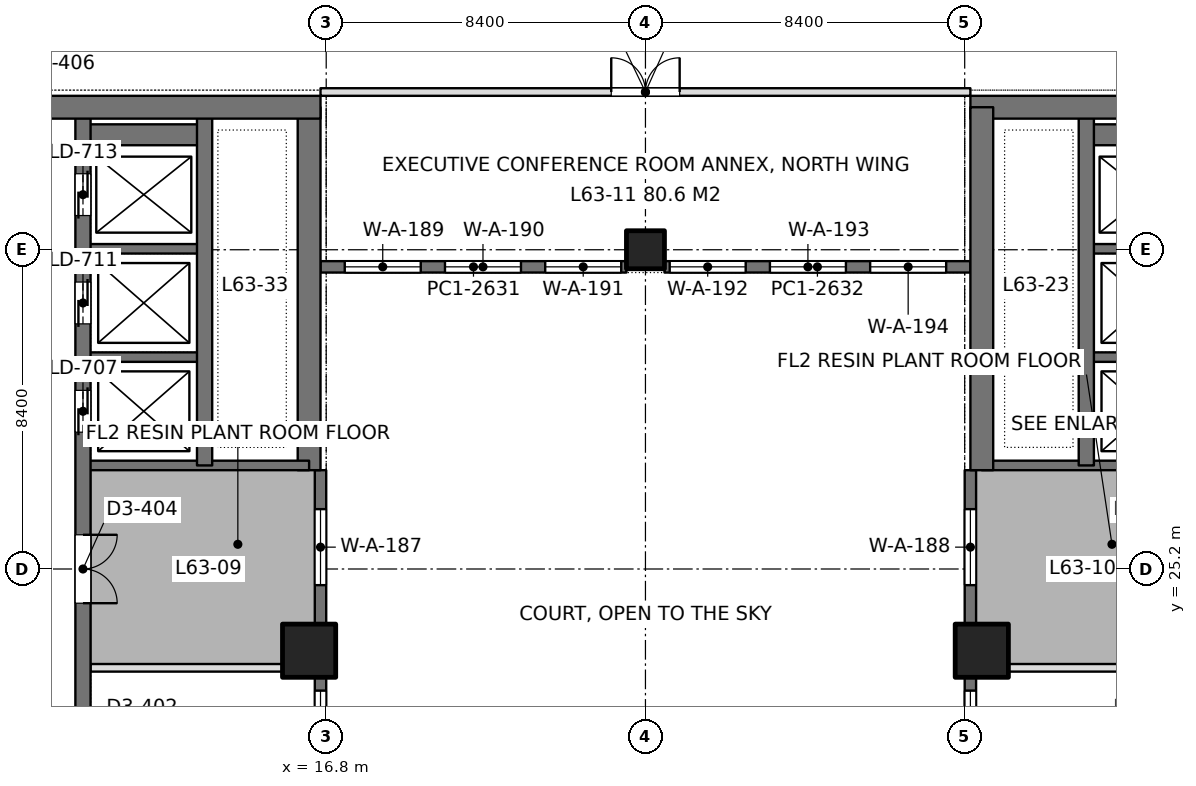
"""IFC4 building model, lengths in metres.
Left out: names, types, materials, properties, quantities, classifications, styles, units other than length and angle.
Written with IfcOpenShell. Run it as: python <this file> out.ifc"""

import sys

from ifc_helpers import new_model, si_unit, direction, frame, frame_2d, origin, origin_2d, place, context, subcontext, project, spatial, rectangle, extrude, element, fill, save


model = new_model("IFC4")
c1 = context("Model", 3, precision=1e-05, world=origin(), true_north=direction((0.0, 1.0)))
c2 = subcontext(c1, "Body", "Model", "MODEL_VIEW")
j1 = project(units=[si_unit("LENGTHUNIT", "METRE"), si_unit("PLANEANGLEUNIT", "RADIAN")], contexts=[c1])
p1 = place(None, origin())
s1 = spatial("IfcSite", under=j1, at=p1, CompositionType="ELEMENT")
p2 = place(p1, origin())
s2 = spatial("IfcBuilding", under=s1, at=p2, CompositionType="ELEMENT")
p3 = place(p2, frame((0.0, 0.0, 277.2)))
s3 = spatial("IfcBuildingStorey", under=s2, at=p3, CompositionType="ELEMENT", Elevation=277.2)
p4 = place(p3, frame((25.2, 33.6, 0.0), z_axis=(0.0, 0.0, 1.0), x_axis=(1.0, 0.0, 0.0)))
e1 = element("IfcColumn", 1, at=p4, inside=s3, PredefinedType="COLUMN", context=c2, shape_type="SweptSolid", body=[
    extrude(rectangle(XDim=1.0, YDim=1.0, at=origin_2d()), origin(), (0.0, 0.0, 1.0), 4.5),
])
for number, where, z_axis, x_axis in (
    (2, (16.35, 23.05, 0.0), (0.0, 0.0, 1.0), (1.0, 0.0, 0.0)),
    (3, (34.05, 23.05, 0.0), (0.0, 0.0, 1.0), (1.0, 0.0, 0.0)),
):
    element("IfcColumn", number, at=place(p3, frame(where, z_axis=z_axis, x_axis=x_axis)), inside=s3, PredefinedType="COLUMN", context=c2, shape_type="SweptSolid", body=[
        extrude(rectangle(XDim=1.4, YDim=1.4, at=origin_2d()), origin(), (0.0, 0.0, 1.0), 4.5),
    ])
p5 = place(p3, frame((-1.05, 37.35, 0.0), z_axis=(0.0, 0.0, 1.0), x_axis=(1.0, 0.0, 0.0)))
e4 = element("IfcWall", 4, at=p5, inside=s3, PredefinedType="SHEAR", context=c2, shape_type="SweptSolid", body=[
    extrude(rectangle(XDim=17.7, YDim=0.6, at=frame_2d((8.85, 0.0))), origin(), (0.0, 0.0, 1.0), 4.5),
])
p6 = place(p5, frame((8.8, 0.0, 0.0)))
e5 = element("IfcOpeningElement", 5, at=p6, cuts=e4, PredefinedType="OPENING", context=c2, shape_type="SweptSolid", body=[
    extrude(rectangle(XDim=1.8, YDim=2.4, at=frame_2d((0.9, 1.2))), frame((0.0, 0.31, 0.0), z_axis=(0.0, -1.0, 0.0), x_axis=(1.0, 0.0, 0.0)), (0.0, 0.0, 1.0), 0.62),
])
p7 = place(p3, frame((16.35, 27.8, 0.0), z_axis=(0.0, 0.0, 1.0), x_axis=(0.0, 1.0, 0.0)))
e6 = element("IfcWall", 6, at=p7, inside=s3, PredefinedType="SHEAR", context=c2, shape_type="SweptSolid", body=[
    extrude(rectangle(XDim=9.55, YDim=0.6, at=frame_2d((4.775, 0.0))), origin(), (0.0, 0.0, 1.0), 4.5),
])
p8 = place(p3, frame((10.4, 13.05, 0.0), z_axis=(0.0, 0.0, 1.0), x_axis=(0.0, 1.0, 0.0)))
e7 = element("IfcWall", 7, at=p8, inside=s3, PredefinedType="SHEAR", context=c2, shape_type="SweptSolid", body=[
    extrude(rectangle(XDim=24.3, YDim=0.4, at=frame_2d((12.15, 0.0))), origin(), (0.0, 0.0, 1.0), 4.5),
])
p9 = place(p8, frame((15.75, 0.0, 0.0)))
e8 = element("IfcOpeningElement", 8, at=p9, cuts=e7, PredefinedType="OPENING", context=c2, shape_type="SweptSolid", body=[
    extrude(rectangle(XDim=1.1, YDim=2.2, at=frame_2d((0.55, 1.1))), frame((0.0, 0.21, 0.0), z_axis=(0.0, -1.0, 0.0), x_axis=(1.0, 0.0, 0.0)), (0.0, 0.0, 1.0), 0.42),
])
p10 = place(p8, frame((18.6, 0.0, 0.0)))
e9 = element("IfcOpeningElement", 9, at=p10, cuts=e7, PredefinedType="OPENING", context=c2, shape_type="SweptSolid", body=[
    extrude(rectangle(XDim=1.1, YDim=2.2, at=frame_2d((0.55, 1.1))), frame((0.0, 0.21, 0.0), z_axis=(0.0, -1.0, 0.0), x_axis=(1.0, 0.0, 0.0)), (0.0, 0.0, 1.0), 0.42),
])
p11 = place(p8, frame((21.45, 0.0, 0.0)))
e10 = element("IfcOpeningElement", 10, at=p11, cuts=e7, PredefinedType="OPENING", context=c2, shape_type="SweptSolid", body=[
    extrude(rectangle(XDim=1.1, YDim=2.2, at=frame_2d((0.55, 1.1))), frame((0.0, 0.21, 0.0), z_axis=(0.0, -1.0, 0.0), x_axis=(1.0, 0.0, 0.0)), (0.0, 0.0, 1.0), 0.42),
])
p12 = place(p8, frame((6.05, 0.0, 0.0)))
e11 = element("IfcOpeningElement", 11, at=p12, cuts=e7, PredefinedType="OPENING", context=c2, shape_type="SweptSolid", body=[
    extrude(rectangle(XDim=1.8, YDim=2.4, at=frame_2d((0.9, 1.2))), frame((0.0, 0.21, 0.0), z_axis=(0.0, -1.0, 0.0), x_axis=(1.0, 0.0, 0.0)), (0.0, 0.0, 1.0), 0.42),
])
p13 = place(p8, frame((11.25, 0.0, 0.0)))
e12 = element("IfcOpeningElement", 12, at=p13, cuts=e7, PredefinedType="OPENING", context=c2, shape_type="SweptSolid", body=[
    extrude(rectangle(XDim=1.8, YDim=2.4, at=frame_2d((0.9, 1.2))), frame((0.0, 0.21, 0.0), z_axis=(0.0, -1.0, 0.0), x_axis=(1.0, 0.0, 0.0)), (0.0, 0.0, 1.0), 0.42),
])
p14 = place(p3, frame((13.6, 27.925, 0.0), z_axis=(0.0, 0.0, 1.0), x_axis=(0.0, 1.0, 0.0)))
e13 = element("IfcWall", 13, at=p14, inside=s3, PredefinedType="SHEAR", context=c2, shape_type="SweptSolid", body=[
    extrude(rectangle(XDim=9.425, YDim=0.4, at=frame_2d((4.712, 0.0))), origin(), (0.0, 0.0, 1.0), 4.5),
])
p15 = place(p3, frame((10.4, 27.925, 0.0), z_axis=(0.0, 0.0, 1.0), x_axis=(1.0, 0.0, 0.0)))
e14 = element("IfcWall", 14, at=p15, inside=s3, PredefinedType="SHEAR", context=c2, shape_type="SweptSolid", body=[
    extrude(rectangle(XDim=5.95, YDim=0.25, at=frame_2d((2.975, 0.0))), origin(), (0.0, 0.0, 1.0), 4.5),
])
for number, where, z_axis, x_axis in (
    (15, (10.4, 30.775, 0.0), (0.0, 0.0, 1.0), (1.0, 0.0, 0.0)),
    (16, (10.4, 33.625, 0.0), (0.0, 0.0, 1.0), (1.0, 0.0, 0.0)),
):
    element("IfcWall", number, at=place(p3, frame(where, z_axis=z_axis, x_axis=x_axis)), inside=s3, PredefinedType="SHEAR", context=c2, shape_type="SweptSolid", body=[
        extrude(rectangle(XDim=3.2, YDim=0.25, at=frame_2d((1.6, 0.0))), origin(), (0.0, 0.0, 1.0), 4.5),
    ])
p16 = place(p3, frame((10.4, 36.625, 0.0), z_axis=(0.0, 0.0, 1.0), x_axis=(1.0, 0.0, 0.0)))
e17 = element("IfcWall", 17, at=p16, inside=s3, PredefinedType="SHEAR", context=c2, shape_type="SweptSolid", body=[
    extrude(rectangle(XDim=3.2, YDim=0.55, at=frame_2d((1.6, 0.0))), origin(), (0.0, 0.0, 1.0), 4.5),
])
p17 = place(p3, frame((33.75, 37.35, 0.0), z_axis=(0.0, 0.0, 1.0), x_axis=(1.0, 0.0, 0.0)))
e18 = element("IfcWall", 18, at=p17, inside=s3, PredefinedType="SHEAR", context=c2, shape_type="SweptSolid", body=[
    extrude(rectangle(XDim=17.7, YDim=0.6, at=frame_2d((8.85, 0.0))), origin(), (0.0, 0.0, 1.0), 4.5),
])
p18 = place(p17, frame((7.1, 0.0, 0.0)))
e19 = element("IfcOpeningElement", 19, at=p18, cuts=e18, PredefinedType="OPENING", context=c2, shape_type="SweptSolid", body=[
    extrude(rectangle(XDim=1.8, YDim=2.4, at=frame_2d((0.9, 1.2))), frame((0.0, 0.31, 0.0), z_axis=(0.0, -1.0, 0.0), x_axis=(1.0, 0.0, 0.0)), (0.0, 0.0, 1.0), 0.62),
])
p19 = place(p3, frame((34.05, 27.8, 0.0), z_axis=(0.0, 0.0, 1.0), x_axis=(0.0, 1.0, 0.0)))
e20 = element("IfcWall", 20, at=p19, inside=s3, PredefinedType="SHEAR", context=c2, shape_type="SweptSolid", body=[
    extrude(rectangle(XDim=9.55, YDim=0.6, at=frame_2d((4.775, 0.0))), origin(), (0.0, 0.0, 1.0), 4.5),
])
p20 = place(p3, frame((36.8, 27.925, 0.0), z_axis=(0.0, 0.0, 1.0), x_axis=(0.0, 1.0, 0.0)))
e21 = element("IfcWall", 21, at=p20, inside=s3, PredefinedType="SHEAR", context=c2, shape_type="SweptSolid", body=[
    extrude(rectangle(XDim=9.425, YDim=0.4, at=frame_2d((4.712, 0.0))), origin(), (0.0, 0.0, 1.0), 4.5),
])
p21 = place(p3, frame((40.0, 27.925, 0.0), z_axis=(0.0, 0.0, 1.0), x_axis=(-1.0, 0.0, 0.0)))
e22 = element("IfcWall", 22, at=p21, inside=s3, PredefinedType="SHEAR", context=c2, shape_type="SweptSolid", body=[
    extrude(rectangle(XDim=5.95, YDim=0.25, at=frame_2d((2.975, 0.0))), origin(), (0.0, 0.0, 1.0), 4.5),
])
for number, where, z_axis, x_axis in (
    (23, (40.0, 30.775, 0.0), (0.0, 0.0, 1.0), (-1.0, 0.0, 0.0)),
    (24, (40.0, 33.625, 0.0), (0.0, 0.0, 1.0), (-1.0, 0.0, 0.0)),
):
    element("IfcWall", number, at=place(p3, frame(where, z_axis=z_axis, x_axis=x_axis)), inside=s3, PredefinedType="SHEAR", context=c2, shape_type="SweptSolid", body=[
        extrude(rectangle(XDim=3.2, YDim=0.25, at=frame_2d((1.6, 0.0))), origin(), (0.0, 0.0, 1.0), 4.5),
    ])
p22 = place(p3, frame((40.0, 36.625, 0.0), z_axis=(0.0, 0.0, 1.0), x_axis=(-1.0, 0.0, 0.0)))
e25 = element("IfcWall", 25, at=p22, inside=s3, PredefinedType="SHEAR", context=c2, shape_type="SweptSolid", body=[
    extrude(rectangle(XDim=3.2, YDim=0.55, at=frame_2d((1.6, 0.0))), origin(), (0.0, 0.0, 1.0), 4.5),
])
p23 = place(p3, frame((16.65, 17.1, 0.0), z_axis=(0.0, 0.0, 1.0), x_axis=(0.0, 1.0, 0.0)))
e26 = element("IfcWall", 26, at=p23, inside=s3, PredefinedType="SOLIDWALL", context=c2, shape_type="SweptSolid", body=[
    extrude(rectangle(XDim=10.7, YDim=0.3, at=frame_2d((5.35, 0.0))), origin(), (0.0, 0.0, 1.0), 4.3),
])
p24 = place(p23, frame((0.55, 0.0, 0.1)))
e27 = element("IfcOpeningElement", 27, at=p24, cuts=e26, PredefinedType="OPENING", context=c2, shape_type="SweptSolid", body=[
    extrude(rectangle(XDim=2.0, YDim=3.0, at=frame_2d((1.0, 1.5))), frame((0.0, 0.16, 0.0), z_axis=(0.0, -1.0, 0.0), x_axis=(1.0, 0.0, 0.0)), (0.0, 0.0, 1.0), 0.32),
])
p25 = place(p23, frame((2.9, 0.0, 0.1)))
e28 = element("IfcOpeningElement", 28, at=p25, cuts=e26, PredefinedType="OPENING", context=c2, shape_type="SweptSolid", body=[
    extrude(rectangle(XDim=2.0, YDim=3.0, at=frame_2d((1.0, 1.5))), frame((0.0, 0.16, 0.0), z_axis=(0.0, -1.0, 0.0), x_axis=(1.0, 0.0, 0.0)), (0.0, 0.0, 1.0), 0.32),
])
p26 = place(p23, frame((7.675, 0.0, 0.1)))
e29 = element("IfcOpeningElement", 29, at=p26, cuts=e26, PredefinedType="OPENING", context=c2, shape_type="SweptSolid", body=[
    extrude(rectangle(XDim=2.0, YDim=3.0, at=frame_2d((1.0, 1.5))), frame((0.0, 0.16, 0.0), z_axis=(0.0, -1.0, 0.0), x_axis=(1.0, 0.0, 0.0)), (0.0, 0.0, 1.0), 0.32),
])
p27 = place(p3, frame((33.75, 17.1, 0.0), z_axis=(0.0, 0.0, 1.0), x_axis=(0.0, 1.0, 0.0)))
e30 = element("IfcWall", 30, at=p27, inside=s3, PredefinedType="SOLIDWALL", context=c2, shape_type="SweptSolid", body=[
    extrude(rectangle(XDim=10.7, YDim=0.3, at=frame_2d((5.35, 0.0))), origin(), (0.0, 0.0, 1.0), 4.3),
])
p28 = place(p27, frame((0.55, 0.0, 0.1)))
e31 = element("IfcOpeningElement", 31, at=p28, cuts=e30, PredefinedType="OPENING", context=c2, shape_type="SweptSolid", body=[
    extrude(rectangle(XDim=2.0, YDim=3.0, at=frame_2d((1.0, 1.5))), frame((0.0, 0.16, 0.0), z_axis=(0.0, -1.0, 0.0), x_axis=(1.0, 0.0, 0.0)), (0.0, 0.0, 1.0), 0.32),
])
p29 = place(p27, frame((2.9, 0.0, 0.1)))
e32 = element("IfcOpeningElement", 32, at=p29, cuts=e30, PredefinedType="OPENING", context=c2, shape_type="SweptSolid", body=[
    extrude(rectangle(XDim=2.0, YDim=3.0, at=frame_2d((1.0, 1.5))), frame((0.0, 0.16, 0.0), z_axis=(0.0, -1.0, 0.0), x_axis=(1.0, 0.0, 0.0)), (0.0, 0.0, 1.0), 0.32),
])
p30 = place(p27, frame((7.675, 0.0, 0.1)))
e33 = element("IfcOpeningElement", 33, at=p30, cuts=e30, PredefinedType="OPENING", context=c2, shape_type="SweptSolid", body=[
    extrude(rectangle(XDim=2.0, YDim=3.0, at=frame_2d((1.0, 1.5))), frame((0.0, 0.16, 0.0), z_axis=(0.0, -1.0, 0.0), x_axis=(1.0, 0.0, 0.0)), (0.0, 0.0, 1.0), 0.32),
])
p31 = place(p3, frame((16.65, 33.15, 0.0), z_axis=(0.0, 0.0, 1.0), x_axis=(1.0, 0.0, 0.0)))
e34 = element("IfcWall", 34, at=p31, inside=s3, PredefinedType="SOLIDWALL", context=c2, shape_type="SweptSolid", body=[
    extrude(rectangle(XDim=8.05, YDim=0.3, at=frame_2d((4.025, 0.0))), origin(), (0.0, 0.0, 1.0), 4.3),
])
p32 = place(p31, frame((0.637, 0.0, 0.1)))
e35 = element("IfcOpeningElement", 35, at=p32, cuts=e34, PredefinedType="OPENING", context=c2, shape_type="SweptSolid", body=[
    extrude(rectangle(XDim=2.0, YDim=3.0, at=frame_2d((1.0, 1.5))), frame((0.0, 0.16, 0.0), z_axis=(0.0, -1.0, 0.0), x_axis=(1.0, 0.0, 0.0)), (0.0, 0.0, 1.0), 0.32),
])
p33 = place(p31, frame((3.275, 0.0, 0.1)))
e36 = element("IfcOpeningElement", 36, at=p33, cuts=e34, PredefinedType="OPENING", context=c2, shape_type="SweptSolid", body=[
    extrude(rectangle(XDim=2.0, YDim=3.0, at=frame_2d((1.0, 1.5))), frame((0.0, 0.16, 0.0), z_axis=(0.0, -1.0, 0.0), x_axis=(1.0, 0.0, 0.0)), (0.0, 0.0, 1.0), 0.32),
])
p34 = place(p31, frame((5.913, 0.0, 0.1)))
e37 = element("IfcOpeningElement", 37, at=p34, cuts=e34, PredefinedType="OPENING", context=c2, shape_type="SweptSolid", body=[
    extrude(rectangle(XDim=2.0, YDim=3.0, at=frame_2d((1.0, 1.5))), frame((0.0, 0.16, 0.0), z_axis=(0.0, -1.0, 0.0), x_axis=(1.0, 0.0, 0.0)), (0.0, 0.0, 1.0), 0.32),
])
p35 = place(p3, frame((25.7, 33.15, 0.0), z_axis=(0.0, 0.0, 1.0), x_axis=(1.0, 0.0, 0.0)))
e38 = element("IfcWall", 38, at=p35, inside=s3, PredefinedType="SOLIDWALL", context=c2, shape_type="SweptSolid", body=[
    extrude(rectangle(XDim=8.05, YDim=0.3, at=frame_2d((4.025, 0.0))), origin(), (0.0, 0.0, 1.0), 4.3),
])
p36 = place(p35, frame((0.137, 0.0, 0.1)))
e39 = element("IfcOpeningElement", 39, at=p36, cuts=e38, PredefinedType="OPENING", context=c2, shape_type="SweptSolid", body=[
    extrude(rectangle(XDim=2.0, YDim=3.0, at=frame_2d((1.0, 1.5))), frame((0.0, 0.16, 0.0), z_axis=(0.0, -1.0, 0.0), x_axis=(1.0, 0.0, 0.0)), (0.0, 0.0, 1.0), 0.32),
])
p37 = place(p35, frame((2.775, 0.0, 0.1)))
e40 = element("IfcOpeningElement", 40, at=p37, cuts=e38, PredefinedType="OPENING", context=c2, shape_type="SweptSolid", body=[
    extrude(rectangle(XDim=2.0, YDim=3.0, at=frame_2d((1.0, 1.5))), frame((0.0, 0.16, 0.0), z_axis=(0.0, -1.0, 0.0), x_axis=(1.0, 0.0, 0.0)), (0.0, 0.0, 1.0), 0.32),
])
p38 = place(p35, frame((5.413, 0.0, 0.1)))
e41 = element("IfcOpeningElement", 41, at=p38, cuts=e38, PredefinedType="OPENING", context=c2, shape_type="SweptSolid", body=[
    extrude(rectangle(XDim=2.0, YDim=3.0, at=frame_2d((1.0, 1.5))), frame((0.0, 0.16, 0.0), z_axis=(0.0, -1.0, 0.0), x_axis=(1.0, 0.0, 0.0)), (0.0, 0.0, 1.0), 0.32),
])
for number, where, z_axis, x_axis in (
    (42, (10.598, 22.6, 0.0), (0.0, 0.0, 1.0), (1.0, 0.0, 0.0)),
    (43, (34.749, 22.6, 0.0), (0.0, 0.0, 1.0), (1.0, 0.0, 0.0)),
):
    element("IfcWall", number, at=place(p3, frame(where, z_axis=z_axis, x_axis=x_axis)), inside=s3, PredefinedType="PARTITIONING", context=c2, shape_type="SweptSolid", body=[
        extrude(rectangle(XDim=5.053, YDim=0.2, at=frame_2d((2.526, 0.0))), origin(), (0.0, 0.0, 1.0), 4.3),
    ])
p39 = place(p3, frame((16.65, 37.75, 0.0), z_axis=(0.0, 0.0, 1.0), x_axis=(1.0, 0.0, 0.0)))
e44 = element("IfcWall", 44, at=p39, inside=s3, PredefinedType="PARTITIONING", context=c2, shape_type="SweptSolid", body=[
    extrude(rectangle(XDim=17.1, YDim=0.2, at=frame_2d((8.55, 0.0))), origin(), (0.0, 0.0, 1.0), 3.182),
])
p40 = place(p39, frame((7.65, 0.0, 0.0)))
e45 = element("IfcOpeningElement", 45, at=p40, cuts=e44, PredefinedType="OPENING", context=c2, shape_type="SweptSolid", body=[
    extrude(rectangle(XDim=1.8, YDim=2.2, at=frame_2d((0.9, 1.1))), frame((0.0, 0.11, 0.0), z_axis=(0.0, -1.0, 0.0), x_axis=(1.0, 0.0, 0.0)), (0.0, 0.0, 1.0), 0.22),
])
p41 = place(p25, origin())
e46 = element("IfcWindow", 46, at=p41, inside=s3, PartitioningType="SINGLE_PANEL", PredefinedType="WINDOW", context=c2, shape_type="SweptSolid", body=[
    extrude(rectangle(XDim=2.0, YDim=3.0, at=frame_2d((1.0, 1.5))), frame((0.0, 0.03, 0.0), z_axis=(0.0, -1.0, 0.0), x_axis=(1.0, 0.0, 0.0)), (0.0, 0.0, 1.0), 0.06),
])
fill(e28, e46)
p42 = place(p26, origin())
e47 = element("IfcWindow", 47, at=p42, inside=s3, PartitioningType="SINGLE_PANEL", PredefinedType="WINDOW", context=c2, shape_type="SweptSolid", body=[
    extrude(rectangle(XDim=2.0, YDim=3.0, at=frame_2d((1.0, 1.5))), frame((0.0, 0.03, 0.0), z_axis=(0.0, -1.0, 0.0), x_axis=(1.0, 0.0, 0.0)), (0.0, 0.0, 1.0), 0.06),
])
fill(e29, e47)
p43 = place(p29, origin())
e48 = element("IfcWindow", 48, at=p43, inside=s3, PartitioningType="SINGLE_PANEL", PredefinedType="WINDOW", context=c2, shape_type="SweptSolid", body=[
    extrude(rectangle(XDim=2.0, YDim=3.0, at=frame_2d((1.0, 1.5))), frame((0.0, 0.03, 0.0), z_axis=(0.0, -1.0, 0.0), x_axis=(1.0, 0.0, 0.0)), (0.0, 0.0, 1.0), 0.06),
])
fill(e32, e48)
p44 = place(p30, origin())
e49 = element("IfcWindow", 49, at=p44, inside=s3, PartitioningType="SINGLE_PANEL", PredefinedType="WINDOW", context=c2, shape_type="SweptSolid", body=[
    extrude(rectangle(XDim=2.0, YDim=3.0, at=frame_2d((1.0, 1.5))), frame((0.0, 0.03, 0.0), z_axis=(0.0, -1.0, 0.0), x_axis=(1.0, 0.0, 0.0)), (0.0, 0.0, 1.0), 0.06),
])
fill(e33, e49)
p45 = place(p32, origin())
e50 = element("IfcWindow", 50, at=p45, inside=s3, PartitioningType="SINGLE_PANEL", PredefinedType="WINDOW", context=c2, shape_type="SweptSolid", body=[
    extrude(rectangle(XDim=2.0, YDim=3.0, at=frame_2d((1.0, 1.5))), frame((0.0, 0.03, 0.0), z_axis=(0.0, -1.0, 0.0), x_axis=(1.0, 0.0, 0.0)), (0.0, 0.0, 1.0), 0.06),
])
fill(e35, e50)
p46 = place(p33, origin())
e51 = element("IfcWindow", 51, at=p46, inside=s3, PartitioningType="SINGLE_PANEL", PredefinedType="WINDOW", context=c2, shape_type="SweptSolid", body=[
    extrude(rectangle(XDim=2.0, YDim=3.0, at=frame_2d((1.0, 1.5))), frame((0.0, 0.03, 0.0), z_axis=(0.0, -1.0, 0.0), x_axis=(1.0, 0.0, 0.0)), (0.0, 0.0, 1.0), 0.06),
])
fill(e36, e51)
p47 = place(p34, origin())
e52 = element("IfcWindow", 52, at=p47, inside=s3, PartitioningType="SINGLE_PANEL", PredefinedType="WINDOW", context=c2, shape_type="SweptSolid", body=[
    extrude(rectangle(XDim=2.0, YDim=3.0, at=frame_2d((1.0, 1.5))), frame((0.0, 0.03, 0.0), z_axis=(0.0, -1.0, 0.0), x_axis=(1.0, 0.0, 0.0)), (0.0, 0.0, 1.0), 0.06),
])
fill(e37, e52)
p48 = place(p36, origin())
e53 = element("IfcWindow", 53, at=p48, inside=s3, PartitioningType="SINGLE_PANEL", PredefinedType="WINDOW", context=c2, shape_type="SweptSolid", body=[
    extrude(rectangle(XDim=2.0, YDim=3.0, at=frame_2d((1.0, 1.5))), frame((0.0, 0.03, 0.0), z_axis=(0.0, -1.0, 0.0), x_axis=(1.0, 0.0, 0.0)), (0.0, 0.0, 1.0), 0.06),
])
fill(e39, e53)
p49 = place(p37, origin())
e54 = element("IfcWindow", 54, at=p49, inside=s3, PartitioningType="SINGLE_PANEL", PredefinedType="WINDOW", context=c2, shape_type="SweptSolid", body=[
    extrude(rectangle(XDim=2.0, YDim=3.0, at=frame_2d((1.0, 1.5))), frame((0.0, 0.03, 0.0), z_axis=(0.0, -1.0, 0.0), x_axis=(1.0, 0.0, 0.0)), (0.0, 0.0, 1.0), 0.06),
])
fill(e40, e54)
p50 = place(p38, origin())
e55 = element("IfcWindow", 55, at=p50, inside=s3, PartitioningType="SINGLE_PANEL", PredefinedType="WINDOW", context=c2, shape_type="SweptSolid", body=[
    extrude(rectangle(XDim=2.0, YDim=3.0, at=frame_2d((1.0, 1.5))), frame((0.0, 0.03, 0.0), z_axis=(0.0, -1.0, 0.0), x_axis=(1.0, 0.0, 0.0)), (0.0, 0.0, 1.0), 0.06),
])
fill(e41, e55)
p51 = place(p9, origin())
e56 = element("IfcDoor", 56, at=p51, inside=s3, OperationType="DOUBLE_DOOR_SLIDING", PredefinedType="DOOR", context=c2, shape_type="SweptSolid", body=[
    extrude(rectangle(XDim=1.1, YDim=2.2, at=frame_2d((0.55, 1.1))), frame((0.0, 0.025, 0.0), z_axis=(0.0, -1.0, 0.0), x_axis=(1.0, 0.0, 0.0)), (0.0, 0.0, 1.0), 0.05),
])
fill(e8, e56)
p52 = place(p10, origin())
e57 = element("IfcDoor", 57, at=p52, inside=s3, OperationType="DOUBLE_DOOR_SLIDING", PredefinedType="DOOR", context=c2, shape_type="SweptSolid", body=[
    extrude(rectangle(XDim=1.1, YDim=2.2, at=frame_2d((0.55, 1.1))), frame((0.0, 0.025, 0.0), z_axis=(0.0, -1.0, 0.0), x_axis=(1.0, 0.0, 0.0)), (0.0, 0.0, 1.0), 0.05),
])
fill(e9, e57)
p53 = place(p11, origin())
e58 = element("IfcDoor", 58, at=p53, inside=s3, OperationType="DOUBLE_DOOR_SLIDING", PredefinedType="DOOR", context=c2, shape_type="SweptSolid", body=[
    extrude(rectangle(XDim=1.1, YDim=2.2, at=frame_2d((0.55, 1.1))), frame((0.0, 0.025, 0.0), z_axis=(0.0, -1.0, 0.0), x_axis=(1.0, 0.0, 0.0)), (0.0, 0.0, 1.0), 0.05),
])
fill(e10, e58)
p54 = place(p13, frame((1.8, 0.0, 0.0), z_axis=(0.0, 0.0, 1.0), x_axis=(-1.0, 0.0, 0.0)))
e59 = element("IfcDoor", 59, at=p54, inside=s3, OperationType="DOUBLE_DOOR_SINGLE_SWING", PredefinedType="DOOR", context=c2, shape_type="SweptSolid", body=[
    extrude(rectangle(XDim=1.8, YDim=2.4, at=frame_2d((0.9, 1.2))), frame((0.0, 0.025, 0.0), z_axis=(0.0, -1.0, 0.0), x_axis=(1.0, 0.0, 0.0)), (0.0, 0.0, 1.0), 0.05),
])
fill(e12, e59)
p55 = place(p40, origin())
e60 = element("IfcDoor", 60, at=p55, inside=s3, OperationType="DOUBLE_DOOR_SINGLE_SWING", PredefinedType="DOOR", context=c2, shape_type="SweptSolid", body=[
    extrude(rectangle(XDim=1.8, YDim=2.2, at=frame_2d((0.9, 1.1))), frame((0.0, 0.025, 0.0), z_axis=(0.0, -1.0, 0.0), x_axis=(1.0, 0.0, 0.0)), (0.0, 0.0, 1.0), 0.05),
])
fill(e45, e60)
save(model, sys.argv[1])
